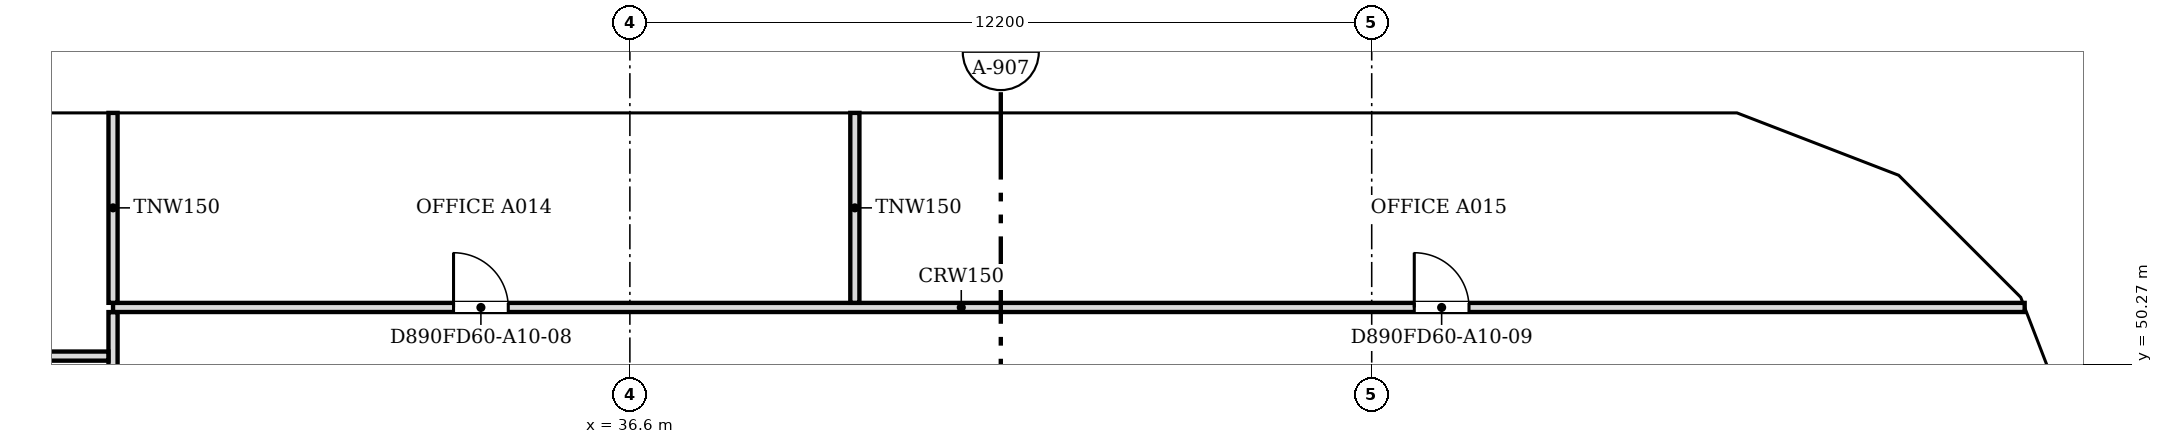
"""IFC4 building model, lengths in metres.
Left out: names, types, materials, properties, quantities, classifications, styles, units other than length and angle.
Written with IfcOpenShell. Run it as: python <this file> out.ifc"""

import sys

from ifc_helpers import new_model, si_unit, direction, frame, frame_2d, origin, place, context, subcontext, project, spatial, polyline, rectangle, outline, extrude, faceted_brep, source, transform, mapped, element, fill, save


model = new_model("IFC4")
c1 = context("Model", 3, precision=1e-05, world=origin(), true_north=direction((0.0, 1.0)))
c2 = subcontext(c1, "Body", "Model", "MODEL_VIEW")
j1 = project(units=[si_unit("LENGTHUNIT", "METRE"), si_unit("PLANEANGLEUNIT", "RADIAN")], contexts=[c1])
p1 = place(None, origin())
s1 = spatial("IfcSite", under=j1, at=p1, CompositionType="ELEMENT")
p2 = place(p1, origin())
s2 = spatial("IfcBuilding", under=s1, at=p2, CompositionType="ELEMENT")
p3 = place(p2, frame((0.0, 0.0, 112.6)))
s3 = spatial("IfcBuildingStorey", under=s2, at=p3, CompositionType="ELEMENT", Elevation=112.6)
m1 = source(origin(), c2, "Body", "Brep", [
    faceted_brep([(3.003, -0.25, 3.731), (2.95, -0.25, 3.8), (0.0, -0.25, 0.0), (3.003, -0.25, 0.0), (0.047, 0.25, 0.06), (2.898, 0.25, 3.732), (2.898, 0.25, 0.0), (0.047, 0.25, 0.0), (2.95, 0.0, 3.8), (0.0, 0.0, 0.0)], [[[0, 1, 2, 3]], [[4, 5, 6, 7]], [[8, 1, 0]], [[5, 4, 9, 2, 1, 8]], [[7, 6, 3, 2, 9]], [[7, 9, 4]], [[3, 6, 5, 8, 0]]]),
])
p4 = place(p3, frame((60.75, 48.753, 0.0), z_axis=(0.0, 0.0, 1.0), x_axis=(-0.35992665181, 0.932980602862, 0.0)))
e1 = element("IfcWall", 1, at=p4, inside=s3, PredefinedType="SOLIDWALL", context=c2, shape_type="MappedRepresentation", body=[
    mapped(m1, transform((0.0, 0.0, 0.0), scale=1.0)),
])
m2 = source(origin(), c2, "Body", "SweptSolid", [
    extrude(outline(polyline([(2.75, 3.135), (0.511, 0.25), (2.75, 0.25), (2.75, 3.135)])), frame((0.0, 0.26, 0.0), z_axis=(0.0, -1.0, 0.0), x_axis=(1.0, 0.0, 0.0)), (0.0, 0.0, 1.0), 0.52),
])
p5 = place(p4, origin())
e2 = element("IfcOpeningElement", 2, at=p5, cuts=e1, PredefinedType="OPENING", context=c2, shape_type="MappedRepresentation", body=[
    mapped(m2, transform((0.0, 0.0, 0.0), scale=1.0)),
])
m3 = source(origin(), c2, "Body", "Brep", [
    faceted_brep([(2.997, -0.25, 0.0), (0.053, -0.25, 3.8), (0.0, -0.25, 3.732), (0.0, -0.25, 0.0), (0.106, 0.25, 3.731), (2.944, 0.25, 0.068), (2.944, 0.25, 0.0), (0.106, 0.25, 0.0), (0.053, 0.0, 3.8), (2.997, 0.0, 0.0)], [[[0, 1, 2, 3]], [[4, 5, 6, 7]], [[5, 4, 8, 1, 0, 9]], [[2, 1, 8]], [[7, 6, 9, 0, 3]], [[7, 3, 2, 8, 4]], [[9, 6, 5]]]),
])
p6 = place(p3, frame((59.726, 51.469, 0.0), z_axis=(0.0, 0.0, 1.0), x_axis=(-0.707106781187, 0.707106781187, 0.0)))
e3 = element("IfcWall", 3, at=p6, inside=s3, PredefinedType="SOLIDWALL", context=c2, shape_type="MappedRepresentation", body=[
    mapped(m3, transform((0.0, 0.0, 0.0), scale=1.0)),
])
m4 = source(origin(), c2, "Body", "SweptSolid", [
    extrude(outline(polyline([(2.487, 0.25), (0.253, 3.134), (0.253, 0.25), (2.487, 0.25)])), frame((0.0, 0.26, 0.0), z_axis=(0.0, -1.0, 0.0), x_axis=(1.0, 0.0, 0.0)), (0.0, 0.0, 1.0), 0.52),
])
p7 = place(p6, origin())
e4 = element("IfcOpeningElement", 4, at=p7, cuts=e3, PredefinedType="OPENING", context=c2, shape_type="MappedRepresentation", body=[
    mapped(m4, transform((0.0, 0.0, 0.0), scale=1.0)),
])
m5 = source(origin(), c2, "Body", "Brep", [
    faceted_brep([(2.997, -0.25, 3.741), (2.95, -0.25, 3.8), (0.0, -0.25, 0.0), (2.997, -0.25, 0.0), (0.053, 0.25, 0.068), (2.904, 0.25, 3.74), (2.904, 0.25, 0.0), (0.053, 0.25, 0.0), (2.95, 0.0, 3.8), (0.0, 0.0, 0.0)], [[[0, 1, 2, 3]], [[4, 5, 6, 7]], [[8, 1, 0]], [[5, 4, 9, 2, 1, 8]], [[7, 6, 3, 2, 9]], [[7, 9, 4]], [[3, 6, 5, 8, 0]]]),
])
p8 = place(p3, frame((57.606, 53.588, 0.0), z_axis=(0.0, 0.0, 1.0), x_axis=(-0.932990326376, 0.359901446078, 0.0)))
e5 = element("IfcWall", 5, at=p8, inside=s3, PredefinedType="SOLIDWALL", context=c2, shape_type="MappedRepresentation", body=[
    mapped(m5, transform((0.0, 0.0, 0.0), scale=1.0)),
])
p9 = place(p8, origin())
e6 = element("IfcOpeningElement", 6, at=p9, cuts=e5, PredefinedType="OPENING", context=c2, shape_type="MappedRepresentation", body=[
    mapped(m2, transform((0.0, 0.0, 0.0), scale=1.0)),
])
m6 = source(origin(), c2, "Body", "Brep", [
    faceted_brep([(3.05, -0.25, 0.0), (0.047, -0.25, 3.8), (0.0, -0.25, 3.74), (0.0, -0.25, 0.0), (0.093, 0.25, 3.741), (3.05, 0.25, 0.0), (0.093, 0.25, 0.0), (0.047, 0.0, 3.8)], [[[0, 1, 2, 3]], [[4, 5, 6]], [[5, 4, 7, 1, 0]], [[2, 1, 7]], [[6, 5, 0, 3]], [[6, 3, 2, 7, 4]]]),
])
p10 = place(p3, frame((54.9, 54.65, 0.0), z_axis=(0.0, 0.0, 1.0), x_axis=(-1.0, 0.0, 0.0)))
e7 = element("IfcWall", 7, at=p10, inside=s3, PredefinedType="SOLIDWALL", context=c2, shape_type="MappedRepresentation", body=[
    mapped(m6, transform((0.0, 0.0, 0.0), scale=1.0)),
])
m7 = source(origin(), c2, "Body", "SweptSolid", [
    extrude(outline(polyline([(2.534, 0.25), (0.247, 3.144), (0.247, 0.25), (2.534, 0.25)])), frame((0.0, 0.26, 0.0), z_axis=(0.0, -1.0, 0.0), x_axis=(1.0, 0.0, 0.0)), (0.0, 0.0, 1.0), 0.52),
])
p11 = place(p10, origin())
e8 = element("IfcOpeningElement", 8, at=p11, cuts=e7, PredefinedType="OPENING", context=c2, shape_type="MappedRepresentation", body=[
    mapped(m7, transform((0.0, 0.0, 0.0), scale=1.0)),
])
m8 = source(origin(), c2, "Body", "SweptSolid", [
    extrude(outline(polyline([(6.1, 0.0), (3.05, 3.8), (0.0, 0.0), (6.1, 0.0)])), frame((0.0, 0.25, 0.0), z_axis=(0.0, -1.0, 0.0), x_axis=(1.0, 0.0, 0.0)), (0.0, 0.0, 1.0), 0.5),
])
p12 = place(p3, frame((51.85, 54.65, 0.0), z_axis=(0.0, 0.0, 1.0), x_axis=(-1.0, 0.0, 0.0)))
e9 = element("IfcWall", 9, at=p12, inside=s3, PredefinedType="SOLIDWALL", context=c2, shape_type="MappedRepresentation", body=[
    mapped(m8, transform((0.0, 0.0, 0.0), scale=1.0)),
])
m9 = source(origin(), c2, "Body", "SweptSolid", [
    extrude(outline(polyline([(5.579, 0.25), (3.05, 3.4), (0.521, 0.25), (5.579, 0.25)])), frame((0.0, 0.26, 0.0), z_axis=(0.0, -1.0, 0.0), x_axis=(1.0, 0.0, 0.0)), (0.0, 0.0, 1.0), 0.52),
])
p13 = place(p12, origin())
e10 = element("IfcOpeningElement", 10, at=p13, cuts=e9, PredefinedType="OPENING", context=c2, shape_type="MappedRepresentation", body=[
    mapped(m9, transform((0.0, 0.0, 0.0), scale=1.0)),
])
p14 = place(p3, frame((45.75, 54.65, 0.0), z_axis=(0.0, 0.0, 1.0), x_axis=(-1.0, 0.0, 0.0)))
e11 = element("IfcWall", 11, at=p14, inside=s3, PredefinedType="SOLIDWALL", context=c2, shape_type="MappedRepresentation", body=[
    mapped(m8, transform((0.0, 0.0, 0.0), scale=1.0)),
])
p15 = place(p14, origin())
e12 = element("IfcOpeningElement", 12, at=p15, cuts=e11, PredefinedType="OPENING", context=c2, shape_type="MappedRepresentation", body=[
    mapped(m9, transform((0.0, 0.0, 0.0), scale=1.0)),
])
m10 = source(origin(), c2, "Body", "Brep", [
    faceted_brep([(6.1, -0.25, 0.0), (3.05, -0.25, 3.8), (0.0, -0.25, 0.0), (6.1, -0.25, 0.0), (0.0, 0.25, 0.0), (3.05, 0.25, 3.8), (6.1, 0.25, 0.0), (6.1, 0.25, 0.0)], [[[0, 1, 2, 3]], [[4, 5, 6, 7]], [[6, 5, 1, 0]], [[5, 4, 2, 1]], [[4, 7, 3, 2]], [[3, 7, 6, 0]]]),
])
p16 = place(p3, frame((39.65, 54.65, 0.0), z_axis=(0.0, 0.0, 1.0), x_axis=(-1.0, 0.0, 0.0)))
e13 = element("IfcWall", 13, at=p16, inside=s3, PredefinedType="SOLIDWALL", context=c2, shape_type="MappedRepresentation", body=[
    mapped(m10, transform((0.0, 0.0, 0.0), scale=1.0)),
])
p17 = place(p16, origin())
e14 = element("IfcOpeningElement", 14, at=p17, cuts=e13, PredefinedType="OPENING", context=c2, shape_type="MappedRepresentation", body=[
    mapped(m9, transform((0.0, 0.0, 0.0), scale=1.0)),
])
p18 = place(p3, frame((33.55, 54.65, 0.0), z_axis=(0.0, 0.0, 1.0), x_axis=(-1.0, 0.0, 0.0)))
e15 = element("IfcWall", 15, at=p18, inside=s3, PredefinedType="SOLIDWALL", context=c2, shape_type="MappedRepresentation", body=[
    mapped(m8, transform((0.0, 0.0, 0.0), scale=1.0)),
])
p19 = place(p18, origin())
e16 = element("IfcOpeningElement", 16, at=p19, cuts=e15, PredefinedType="OPENING", context=c2, shape_type="MappedRepresentation", body=[
    mapped(m9, transform((0.0, 0.0, 0.0), scale=1.0)),
])
p20 = place(p3, frame((27.45, 54.65, 0.0), z_axis=(0.0, 0.0, 1.0), x_axis=(-1.0, 0.0, 0.0)))
e17 = element("IfcWall", 17, at=p20, inside=s3, PredefinedType="SOLIDWALL", context=c2, shape_type="MappedRepresentation", body=[
    mapped(m10, transform((0.0, 0.0, 0.0), scale=1.0)),
])
p21 = place(p20, origin())
e18 = element("IfcOpeningElement", 18, at=p21, cuts=e17, PredefinedType="OPENING", context=c2, shape_type="MappedRepresentation", body=[
    mapped(m9, transform((0.0, 0.0, 0.0), scale=1.0)),
])
p22 = place(p2, frame((0.0, 0.0, 116.4)))
s4 = spatial("IfcBuildingStorey", under=s2, at=p22, CompositionType="ELEMENT", Elevation=116.4)
m11 = source(origin(), c2, "Body", "Brep", [
    faceted_brep([(0.047, -0.25, 0.0), (2.997, -0.25, 3.8), (0.047, -0.25, 7.6), (0.0, -0.25, 7.541), (0.0, -0.25, 0.059), (0.093, 0.25, 7.54), (2.944, 0.25, 3.868), (2.944, 0.25, 3.732), (0.093, 0.25, 0.06), (2.997, 0.0, 3.8), (0.047, 0.0, 0.0), (0.047, 0.0, 7.6)], [[[0, 1, 2, 3, 4]], [[5, 6, 7, 8]], [[8, 7, 9, 1, 0, 10]], [[6, 5, 11, 2, 1, 9]], [[3, 2, 11]], [[10, 0, 4]], [[8, 10, 4, 3, 11, 5]], [[9, 7, 6]]]),
])
p23 = place(p22, frame((60.767, 48.71, -3.8), z_axis=(0.0, 0.0, 1.0), x_axis=(-0.359901446078, 0.932990326376, 0.0)))
e19 = element("IfcWall", 19, at=p23, inside=s4, PredefinedType="SOLIDWALL", context=c2, shape_type="MappedRepresentation", body=[
    mapped(m11, transform((0.0, 0.0, 0.0), scale=1.0)),
])
m12 = source(origin(), c2, "Body", "SweptSolid", [
    extrude(outline(polyline([(0.247, 0.665), (2.681, 3.8), (0.247, 6.935), (0.247, 0.665)])), frame((0.0, 0.26, 0.0), z_axis=(0.0, -1.0, 0.0), x_axis=(1.0, 0.0, 0.0)), (0.0, 0.0, 1.0), 0.52),
])
p24 = place(p23, origin())
e20 = element("IfcOpeningElement", 20, at=p24, cuts=e19, PredefinedType="OPENING", context=c2, shape_type="MappedRepresentation", body=[
    mapped(m12, transform((0.0, 0.0, 0.0), scale=1.0)),
])
m13 = source(origin(), c2, "Body", "Brep", [
    faceted_brep([(2.944, -0.25, 0.0), (2.997, -0.25, 0.068), (2.997, -0.25, 7.532), (2.944, -0.25, 7.6), (0.0, -0.25, 3.8), (0.053, 0.25, 3.868), (2.891, 0.25, 7.532), (2.891, 0.25, 0.068), (0.053, 0.25, 3.731), (2.944, 0.0, 0.0), (2.944, 0.0, 7.6), (0.0, 0.0, 3.8)], [[[0, 1, 2, 3, 4]], [[5, 6, 7, 8]], [[1, 0, 9]], [[10, 3, 2]], [[6, 5, 11, 4, 3, 10]], [[8, 7, 9, 0, 4, 11]], [[8, 11, 5]], [[1, 9, 7, 6, 10, 2]]]),
])
p25 = place(p22, frame((59.688, 51.506, -3.8), z_axis=(0.0, 0.0, 1.0), x_axis=(-0.707106781187, 0.707106781187, 0.0)))
e21 = element("IfcWall", 21, at=p25, inside=s4, PredefinedType="SOLIDWALL", context=c2, shape_type="MappedRepresentation", body=[
    mapped(m13, transform((0.0, 0.0, 0.0), scale=1.0)),
])
m14 = source(origin(), c2, "Body", "SweptSolid", [
    extrude(outline(polyline([(2.744, 6.934), (0.316, 3.8), (2.744, 0.666), (2.744, 6.934)])), frame((0.0, 0.26, 0.0), z_axis=(0.0, -1.0, 0.0), x_axis=(1.0, 0.0, 0.0)), (0.0, 0.0, 1.0), 0.52),
])
p26 = place(p25, origin())
e22 = element("IfcOpeningElement", 22, at=p26, cuts=e21, PredefinedType="OPENING", context=c2, shape_type="MappedRepresentation", body=[
    mapped(m14, transform((0.0, 0.0, 0.0), scale=1.0)),
])
m15 = source(origin(), c2, "Body", "Brep", [
    faceted_brep([(0.053, -0.25, 0.0), (3.003, -0.25, 3.8), (0.053, -0.25, 7.6), (0.0, -0.25, 7.531), (0.0, -0.25, 0.068), (0.106, 0.25, 7.532), (2.957, 0.25, 3.86), (2.957, 0.25, 3.74), (0.106, 0.25, 0.068), (3.003, 0.0, 3.8), (0.053, 0.0, 0.0), (0.053, 0.0, 7.6)], [[[0, 1, 2, 3, 4]], [[5, 6, 7, 8]], [[8, 7, 9, 1, 0, 10]], [[6, 5, 11, 2, 1, 9]], [[3, 2, 11]], [[10, 0, 4]], [[8, 10, 4, 3, 11, 5]], [[9, 7, 6]]]),
])
p27 = place(p22, frame((57.656, 53.569, -3.8), z_axis=(0.0, 0.0, 1.0), x_axis=(-0.933007896601, 0.359855894603, 0.0)))
e23 = element("IfcWall", 23, at=p27, inside=s4, PredefinedType="SOLIDWALL", context=c2, shape_type="MappedRepresentation", body=[
    mapped(m15, transform((0.0, 0.0, 0.0), scale=1.0)),
])
m16 = source(origin(), c2, "Body", "SweptSolid", [
    extrude(outline(polyline([(0.253, 0.665), (2.687, 3.8), (0.253, 6.935), (0.253, 0.665)])), frame((0.0, 0.26, 0.0), z_axis=(0.0, -1.0, 0.0), x_axis=(1.0, 0.0, 0.0)), (0.0, 0.0, 1.0), 0.52),
])
p28 = place(p27, origin())
e24 = element("IfcOpeningElement", 24, at=p28, cuts=e23, PredefinedType="OPENING", context=c2, shape_type="MappedRepresentation", body=[
    mapped(m16, transform((0.0, 0.0, 0.0), scale=1.0)),
])
m17 = source(origin(), c2, "Body", "Brep", [
    faceted_brep([(3.003, -0.25, 0.0), (6.053, -0.25, 3.8), (3.003, -0.25, 7.6), (0.0, -0.25, 3.8), (0.047, 0.25, 3.859), (3.003, 0.25, 7.6), (6.053, 0.25, 3.8), (3.003, 0.25, 0.0), (0.047, 0.25, 3.741), (0.0, 0.0, 3.8)], [[[0, 1, 2, 3]], [[4, 5, 6, 7, 8]], [[7, 6, 1, 0]], [[6, 5, 2, 1]], [[5, 4, 9, 3, 2]], [[8, 7, 0, 3, 9]], [[8, 9, 4]]]),
])
p29 = place(p22, frame((54.854, 54.65, -3.8), z_axis=(0.0, 0.0, 1.0), x_axis=(-1.0, 0.0, 0.0)))
e25 = element("IfcWall", 25, at=p29, inside=s4, PredefinedType="SOLIDWALL", context=c2, shape_type="MappedRepresentation", body=[
    mapped(m17, transform((0.0, 0.0, 0.0), scale=1.0)),
])
m18 = source(origin(), c2, "Body", "SweptSolid", [
    extrude(outline(polyline([(3.005, 0.401), (5.733, 3.8), (3.005, 7.199), (0.319, 3.8), (3.005, 0.401)])), frame((0.0, 0.26, 0.0), z_axis=(0.0, -1.0, 0.0), x_axis=(1.0, 0.0, 0.0)), (0.0, 0.0, 1.0), 0.52),
])
p30 = place(p29, origin())
e26 = element("IfcOpeningElement", 26, at=p30, cuts=e25, PredefinedType="OPENING", context=c2, shape_type="MappedRepresentation", body=[
    mapped(m18, transform((0.0, 0.0, 0.0), scale=1.0)),
])
m19 = source(origin(), c2, "Body", "SweptSolid", [
    extrude(outline(polyline([(3.05, 0.0), (6.1, 3.8), (3.05, 7.6), (0.0, 3.8), (3.05, 0.0)])), frame((0.0, 0.25, 0.0), z_axis=(0.0, -1.0, 0.0), x_axis=(1.0, 0.0, 0.0)), (0.0, 0.0, 1.0), 0.5),
])
p31 = place(p22, frame((48.8, 54.65, -3.8), z_axis=(0.0, 0.0, 1.0), x_axis=(-1.0, 0.0, 0.0)))
e27 = element("IfcWall", 27, at=p31, inside=s4, PredefinedType="SOLIDWALL", context=c2, shape_type="MappedRepresentation", body=[
    mapped(m19, transform((0.0, 0.0, 0.0), scale=1.0)),
])
m20 = source(origin(), c2, "Body", "SweptSolid", [
    extrude(outline(polyline([(3.05, 0.399), (5.78, 3.8), (3.05, 7.2), (0.321, 3.8), (3.05, 0.399)])), frame((0.0, 0.26, 0.0), z_axis=(0.0, -1.0, 0.0), x_axis=(1.0, 0.0, 0.0)), (0.0, 0.0, 1.0), 0.52),
])
p32 = place(p31, origin())
e28 = element("IfcOpeningElement", 28, at=p32, cuts=e27, PredefinedType="OPENING", context=c2, shape_type="MappedRepresentation", body=[
    mapped(m20, transform((0.0, 0.0, 0.0), scale=1.0)),
])
m21 = source(origin(), c2, "Body", "Brep", [
    faceted_brep([(3.05, -0.25, 0.0), (6.1, -0.25, 3.8), (6.1, -0.25, 3.8), (3.05, -0.25, 7.6), (0.0, -0.25, 3.8), (0.0, 0.25, 3.8), (3.05, 0.25, 7.6), (6.1, 0.25, 3.8), (6.1, 0.25, 3.8), (3.05, 0.25, 0.0)], [[[0, 1, 2, 3, 4]], [[5, 6, 7, 8, 9]], [[9, 8, 1, 0]], [[7, 6, 3, 2]], [[6, 5, 4, 3]], [[5, 9, 0, 4]], [[1, 8, 7, 2]]]),
])
p33 = place(p22, frame((42.7, 54.65, -3.8), z_axis=(0.0, 0.0, 1.0), x_axis=(-1.0, 0.0, 0.0)))
e29 = element("IfcWall", 29, at=p33, inside=s4, PredefinedType="SOLIDWALL", context=c2, shape_type="MappedRepresentation", body=[
    mapped(m21, transform((0.0, 0.0, 0.0), scale=1.0)),
])
p34 = place(p33, origin())
e30 = element("IfcOpeningElement", 30, at=p34, cuts=e29, PredefinedType="OPENING", context=c2, shape_type="MappedRepresentation", body=[
    mapped(m20, transform((0.0, 0.0, 0.0), scale=1.0)),
])
p35 = place(p22, frame((36.6, 54.65, -3.8), z_axis=(0.0, 0.0, 1.0), x_axis=(-1.0, 0.0, 0.0)))
e31 = element("IfcWall", 31, at=p35, inside=s4, PredefinedType="SOLIDWALL", context=c2, shape_type="MappedRepresentation", body=[
    mapped(m19, transform((0.0, 0.0, 0.0), scale=1.0)),
])
p36 = place(p35, origin())
e32 = element("IfcOpeningElement", 32, at=p36, cuts=e31, PredefinedType="OPENING", context=c2, shape_type="MappedRepresentation", body=[
    mapped(m20, transform((0.0, 0.0, 0.0), scale=1.0)),
])
p37 = place(p22, frame((30.5, 54.65, -3.8), z_axis=(0.0, 0.0, 1.0), x_axis=(-1.0, 0.0, 0.0)))
e33 = element("IfcWall", 33, at=p37, inside=s4, PredefinedType="SOLIDWALL", context=c2, shape_type="MappedRepresentation", body=[
    mapped(m19, transform((0.0, 0.0, 0.0), scale=1.0)),
])
p38 = place(p37, origin())
e34 = element("IfcOpeningElement", 34, at=p38, cuts=e33, PredefinedType="OPENING", context=c2, shape_type="MappedRepresentation", body=[
    mapped(m20, transform((0.0, 0.0, 0.0), scale=1.0)),
])
p39 = place(p3, frame((28.1, 47.376, 0.0), z_axis=(0.0, 0.0, 1.0), x_axis=(0.0, 1.0, 0.0)))
e35 = element("IfcWall", 35, at=p39, inside=s3, PredefinedType="PARTITIONING", context=c2, shape_type="SweptSolid", body=[
    extrude(rectangle(XDim=3.748, YDim=0.15, at=frame_2d((1.874, 0.0))), origin(), (0.0, 0.0, 1.0), 3.067),
])
p40 = place(p3, frame((22.75, 50.4, 0.0), z_axis=(0.0, 0.0, 1.0), x_axis=(1.0, 0.0, 0.0)))
e36 = element("IfcWall", 36, at=p40, inside=s3, PredefinedType="PARTITIONING", context=c2, shape_type="SweptSolid", body=[
    extrude(rectangle(XDim=5.274, YDim=0.15, at=frame_2d((2.637, 0.0))), origin(), (0.0, 0.0, 1.0), 3.067),
])
m22 = source(origin(), c2, "Body", "SweptSolid", [
    extrude(rectangle(XDim=0.9, YDim=2.1, at=frame_2d((0.45, 1.05))), frame((0.0, 0.085, 0.0), z_axis=(0.0, -1.0, 0.0), x_axis=(1.0, 0.0, 0.0)), (0.0, 0.0, 1.0), 0.17),
])
p41 = place(p40, frame((2.2, 0.0, 0.0)))
e37 = element("IfcOpeningElement", 37, at=p41, cuts=e36, PredefinedType="OPENING", context=c2, shape_type="MappedRepresentation", body=[
    mapped(m22, transform((0.0, 0.0, 0.0), scale=1.0)),
])
p42 = place(p3, frame((28.1, 51.2, 0.0), z_axis=(0.0, 0.0, 1.0), x_axis=(1.0, 0.0, 0.0)))
e38 = element("IfcWall", 38, at=p42, inside=s3, PredefinedType="PARTITIONING", context=c2, shape_type="SweptSolid", body=[
    extrude(rectangle(XDim=31.438, YDim=0.15, at=frame_2d((15.719, 0.0))), origin(), (0.0, 0.0, 1.0), 3.067),
])
p43 = place(p42, frame((5.6, 0.0, 0.0)))
e39 = element("IfcOpeningElement", 39, at=p43, cuts=e38, PredefinedType="OPENING", context=c2, shape_type="MappedRepresentation", body=[
    mapped(m22, transform((0.0, 0.0, 0.0), scale=1.0)),
])
p44 = place(p42, frame((21.4, 0.0, 0.0)))
e40 = element("IfcOpeningElement", 40, at=p44, cuts=e38, PredefinedType="OPENING", context=c2, shape_type="MappedRepresentation", body=[
    mapped(m22, transform((0.0, 0.0, 0.0), scale=1.0)),
])
for number, where, z_axis, x_axis in (
    (41, (28.1, 51.276, 0.0), (0.0, 0.0, 1.0), (0.0, 1.0, 0.0)),
    (42, (40.3, 51.276, 0.0), (0.0, 0.0, 1.0), (0.0, 1.0, 0.0)),
):
    element("IfcWall", number, at=place(p3, frame(where, z_axis=z_axis, x_axis=x_axis)), inside=s3, PredefinedType="PARTITIONING", context=c2, shape_type="SweptSolid", body=[
        extrude(rectangle(XDim=3.124, YDim=0.15, at=frame_2d((1.562, 0.0))), origin(), (0.0, 0.0, 1.0), 3.067),
    ])
m23 = source(origin(), c2, "Body", "SweptSolid", [
    extrude(rectangle(XDim=0.9, YDim=2.1, at=frame_2d((0.45, 1.05))), frame((0.0, 0.025, 0.0), z_axis=(0.0, -1.0, 0.0), x_axis=(1.0, 0.0, 0.0)), (0.0, 0.0, 1.0), 0.05),
])
p45 = place(p43, origin())
e43 = element("IfcDoor", 43, at=p45, inside=s3, OperationType="SINGLE_SWING_LEFT", PredefinedType="DOOR", context=c2, shape_type="MappedRepresentation", body=[
    mapped(m23, transform((0.0, 0.0, 0.0), scale=1.0)),
])
fill(e39, e43)
p46 = place(p44, origin())
e44 = element("IfcDoor", 44, at=p46, inside=s3, OperationType="SINGLE_SWING_LEFT", PredefinedType="DOOR", context=c2, shape_type="MappedRepresentation", body=[
    mapped(m23, transform((0.0, 0.0, 0.0), scale=1.0)),
])
fill(e40, e44)
save(model, sys.argv[1])
